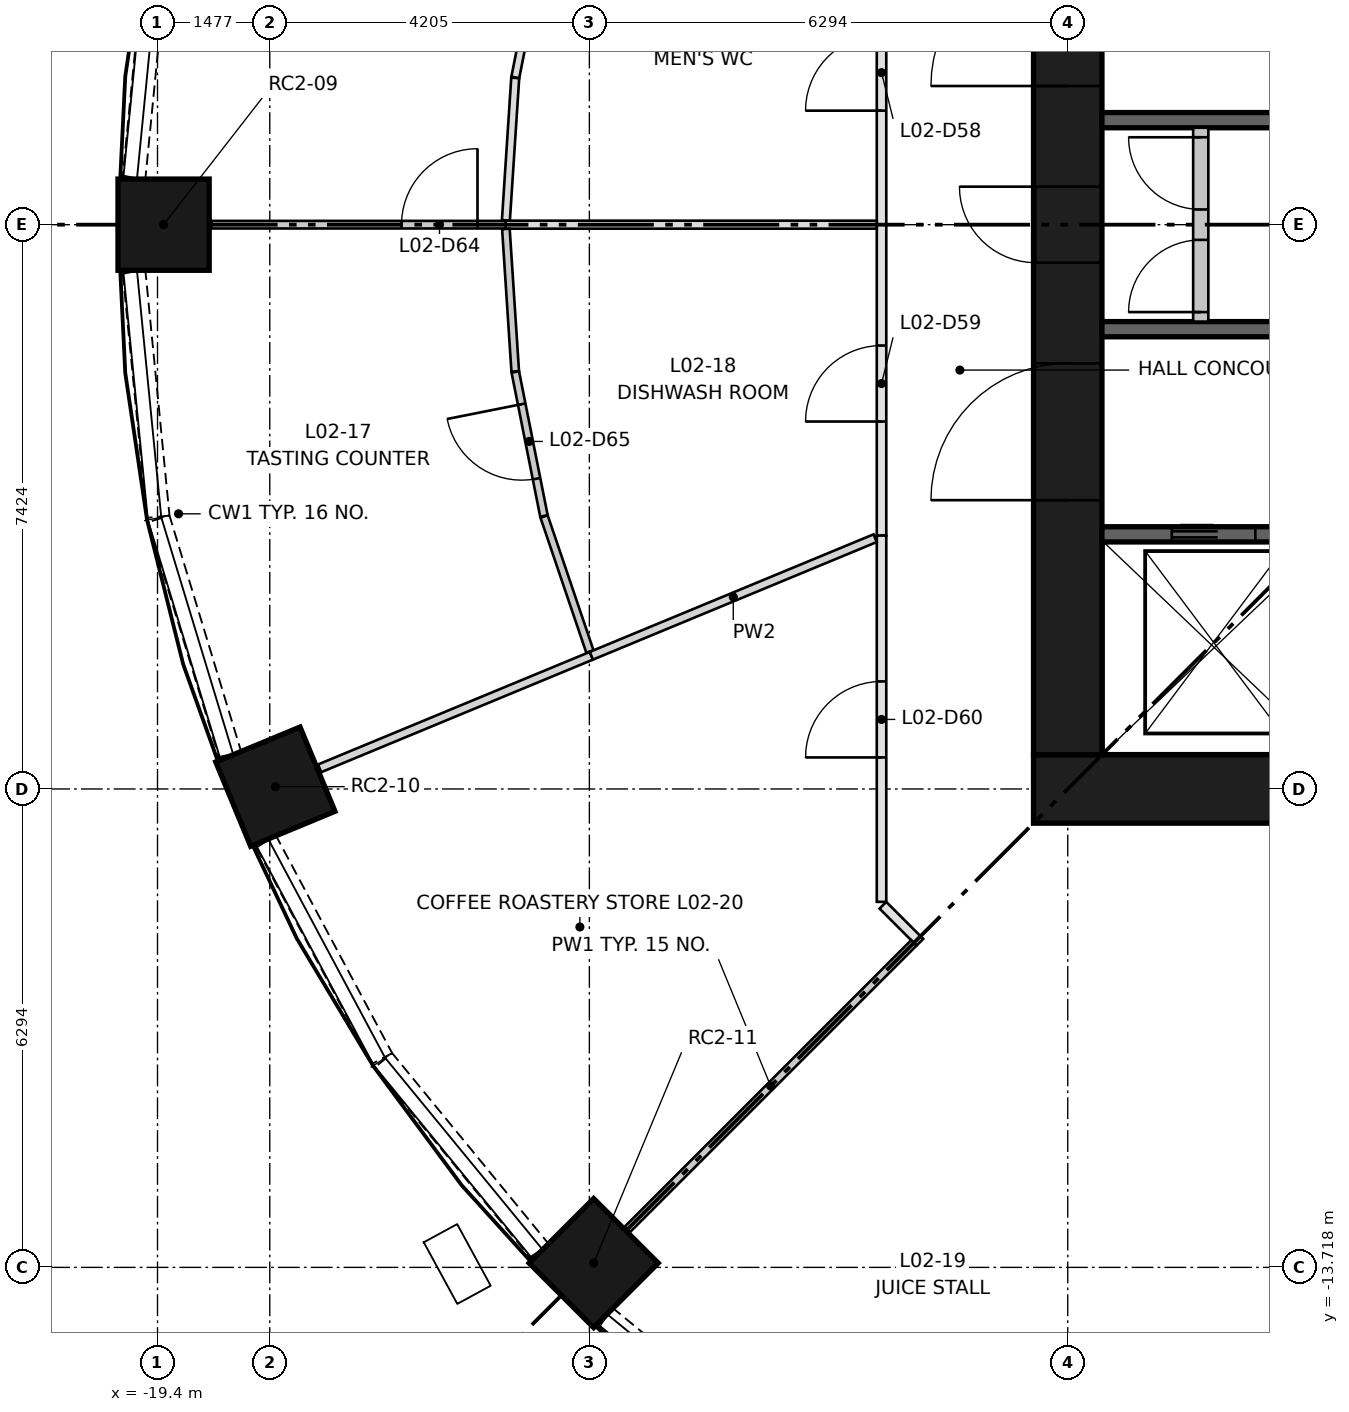
"""IFC4 building model, lengths in metres.
Left out: names, types, materials, properties, quantities, classifications, styles, units other than length and angle.
Written with IfcOpenShell. Run it as: python <this file> out.ifc"""

import sys

from ifc_helpers import new_model, si_unit, direction, frame, frame_2d, origin, origin_2d, place, context, subcontext, project, spatial, rectangle, extrude, element, fill, save


model = new_model("IFC4")
c1 = context("Model", 3, precision=1e-05, world=origin(), true_north=direction((0.0, 1.0)))
c2 = subcontext(c1, "Body", "Model", "MODEL_VIEW")
j1 = project(units=[si_unit("LENGTHUNIT", "METRE"), si_unit("PLANEANGLEUNIT", "RADIAN")], contexts=[c1])
p1 = place(None, origin())
s1 = spatial("IfcSite", under=j1, at=p1, CompositionType="ELEMENT")
p2 = place(p1, origin())
s2 = spatial("IfcBuilding", under=s1, at=p2, CompositionType="ELEMENT")
p3 = place(p2, frame((0.0, 0.0, 9.9)))
s3 = spatial("IfcBuildingStorey", under=s2, at=p3, CompositionType="ELEMENT", Elevation=9.9)
for number, where, z_axis, x_axis in (
    (1, (-19.32, 0.0, 0.0), (0.0, 0.0, 1.0), (-1.0, 0.0, 0.0)),
    (2, (-17.849, -7.394, 0.0), (0.0, 0.0, 1.0), (-0.924, -0.383, 0.0)),
    (3, (-13.661, -13.661, 0.0), (0.0, 0.0, 1.0), (-0.707, -0.707, 0.0)),
):
    element("IfcColumn", number, at=place(p3, frame(where, z_axis=z_axis, x_axis=x_axis)), inside=s3, PredefinedType="COLUMN", context=c2, shape_type="SweptSolid", body=[
        extrude(rectangle(XDim=1.2, YDim=1.2, at=origin_2d()), origin(), (0.0, 0.0, 1.0), 4.5),
    ])
p4 = place(p3, frame((-7.874, -7.424, 0.0), z_axis=(0.0, 0.0, 1.0), x_axis=(1.0, 0.0, 0.0)))
e4 = element("IfcWall", 4, at=p4, inside=s3, PredefinedType="SHEAR", context=c2, shape_type="SweptSolid", body=[
    extrude(rectangle(XDim=15.748, YDim=0.9, at=frame_2d((7.874, 0.0))), origin(), (0.0, 0.0, 1.0), 4.5),
])
p5 = place(p3, frame((-7.424, -6.974, 0.0), z_axis=(0.0, 0.0, 1.0), x_axis=(0.0, 1.0, 0.0)))
e5 = element("IfcWall", 5, at=p5, inside=s3, PredefinedType="SHEAR", context=c2, shape_type="SweptSolid", body=[
    extrude(rectangle(XDim=13.948, YDim=0.9, at=frame_2d((6.974, 0.0))), origin(), (0.0, 0.0, 1.0), 4.5),
])
p6 = place(p5, frame((6.474, 0.0, 0.0)))
e6 = element("IfcOpeningElement", 6, at=p6, cuts=e5, PredefinedType="OPENING", context=c2, shape_type="SweptSolid", body=[
    extrude(rectangle(XDim=1.0, YDim=2.1, at=frame_2d((0.5, 1.05))), frame((0.0, 0.46, 0.0), z_axis=(0.0, -1.0, 0.0), x_axis=(1.0, 0.0, 0.0)), (0.0, 0.0, 1.0), 0.92),
])
p7 = place(p5, frame((3.35, 0.0, 0.0)))
e7 = element("IfcOpeningElement", 7, at=p7, cuts=e5, PredefinedType="OPENING", context=c2, shape_type="SweptSolid", body=[
    extrude(rectangle(XDim=1.8, YDim=2.1, at=frame_2d((0.9, 1.05))), frame((0.0, 0.46, 0.0), z_axis=(0.0, -1.0, 0.0), x_axis=(1.0, 0.0, 0.0)), (0.0, 0.0, 1.0), 0.92),
])
p8 = place(p5, frame((8.799, 0.0, 0.0)))
e8 = element("IfcOpeningElement", 8, at=p8, cuts=e5, PredefinedType="OPENING", context=c2, shape_type="SweptSolid", body=[
    extrude(rectangle(XDim=1.8, YDim=2.1, at=frame_2d((0.9, 1.05))), frame((0.0, 0.46, 0.0), z_axis=(0.0, -1.0, 0.0), x_axis=(1.0, 0.0, 0.0)), (0.0, 0.0, 1.0), 0.92),
])
p9 = place(p5, frame((11.974, 0.0, 0.0)))
e9 = element("IfcOpeningElement", 9, at=p9, cuts=e5, PredefinedType="OPENING", context=c2, shape_type="SweptSolid", body=[
    extrude(rectangle(XDim=1.0, YDim=2.1, at=frame_2d((0.5, 1.05))), frame((0.0, 0.46, 0.0), z_axis=(0.0, -1.0, 0.0), x_axis=(1.0, 0.0, 0.0)), (0.0, 0.0, 1.0), 0.92),
])
p10 = place(p3, frame((-6.974, -4.074, 0.0), z_axis=(0.0, 0.0, 1.0), x_axis=(1.0, 0.0, 0.0)))
e10 = element("IfcWall", 10, at=p10, inside=s3, PredefinedType="SHEAR", context=c2, shape_type="SweptSolid", body=[
    extrude(rectangle(XDim=13.948, YDim=0.2, at=frame_2d((6.974, 0.0))), origin(), (0.0, 0.0, 1.0), 4.1),
])
p11 = place(p10, frame((0.918, 0.0, 0.0)))
e11 = element("IfcOpeningElement", 11, at=p11, cuts=e10, PredefinedType="OPENING", context=c2, shape_type="SweptSolid", body=[
    extrude(rectangle(XDim=1.1, YDim=2.1, at=frame_2d((0.55, 1.05))), frame((0.0, 0.11, 0.0), z_axis=(0.0, -1.0, 0.0), x_axis=(1.0, 0.0, 0.0)), (0.0, 0.0, 1.0), 0.22),
])
p12 = place(p10, frame((4.055, 0.0, 0.0)))
e12 = element("IfcOpeningElement", 12, at=p12, cuts=e10, PredefinedType="OPENING", context=c2, shape_type="SweptSolid", body=[
    extrude(rectangle(XDim=1.1, YDim=2.1, at=frame_2d((0.55, 1.05))), frame((0.0, 0.11, 0.0), z_axis=(0.0, -1.0, 0.0), x_axis=(1.0, 0.0, 0.0)), (0.0, 0.0, 1.0), 0.22),
])
p13 = place(p10, frame((6.658, 0.0, 0.0)))
e13 = element("IfcOpeningElement", 13, at=p13, cuts=e10, PredefinedType="OPENING", context=c2, shape_type="SweptSolid", body=[
    extrude(rectangle(XDim=1.0, YDim=2.1, at=frame_2d((0.5, 1.05))), frame((0.0, 0.11, 0.0), z_axis=(0.0, -1.0, 0.0), x_axis=(1.0, 0.0, 0.0)), (0.0, 0.0, 1.0), 0.22),
])
p14 = place(p10, frame((8.627, 0.0, 0.0)))
e14 = element("IfcOpeningElement", 14, at=p14, cuts=e10, PredefinedType="OPENING", context=c2, shape_type="SweptSolid", body=[
    extrude(rectangle(XDim=1.0, YDim=2.1, at=frame_2d((0.5, 1.05))), frame((0.0, 0.11, 0.0), z_axis=(0.0, -1.0, 0.0), x_axis=(1.0, 0.0, 0.0)), (0.0, 0.0, 1.0), 0.22),
])
p15 = place(p10, frame((10.595, 0.0, 0.0)))
e15 = element("IfcOpeningElement", 15, at=p15, cuts=e10, PredefinedType="OPENING", context=c2, shape_type="SweptSolid", body=[
    extrude(rectangle(XDim=1.0, YDim=2.1, at=frame_2d((0.5, 1.05))), frame((0.0, 0.11, 0.0), z_axis=(0.0, -1.0, 0.0), x_axis=(1.0, 0.0, 0.0)), (0.0, 0.0, 1.0), 0.22),
])
p16 = place(p10, frame((12.564, 0.0, 0.0)))
e16 = element("IfcOpeningElement", 16, at=p16, cuts=e10, PredefinedType="OPENING", context=c2, shape_type="SweptSolid", body=[
    extrude(rectangle(XDim=1.0, YDim=2.1, at=frame_2d((0.5, 1.05))), frame((0.0, 0.11, 0.0), z_axis=(0.0, -1.0, 0.0), x_axis=(1.0, 0.0, 0.0)), (0.0, 0.0, 1.0), 0.22),
])
for number, where, z_axis, x_axis in (
    (17, (-6.974, -1.375, 0.0), (0.0, 0.0, 1.0), (1.0, 0.0, 0.0)),
    (18, (-6.974, 1.375, 0.0), (0.0, 0.0, 1.0), (1.0, 0.0, 0.0)),
):
    element("IfcWall", number, at=place(p3, frame(where, z_axis=z_axis, x_axis=x_axis)), inside=s3, PredefinedType="SHEAR", context=c2, shape_type="SweptSolid", body=[
        extrude(rectangle(XDim=2.6, YDim=0.2, at=frame_2d((1.3, 0.0))), origin(), (0.0, 0.0, 1.0), 4.1),
    ])
p17 = place(p3, frame((-5.674, -1.275, 0.0), z_axis=(0.0, 0.0, 1.0), x_axis=(0.0, 1.0, 0.0)))
e19 = element("IfcWall", 19, at=p17, inside=s3, PredefinedType="PARTITIONING", context=c2, shape_type="SweptSolid", body=[
    extrude(rectangle(XDim=2.55, YDim=0.2, at=frame_2d((1.275, 0.0))), origin(), (0.0, 0.0, 1.0), 4.1),
])
p18 = place(p17, frame((0.125, 0.0, 0.0)))
e20 = element("IfcOpeningElement", 20, at=p18, cuts=e19, PredefinedType="OPENING", context=c2, shape_type="SweptSolid", body=[
    extrude(rectangle(XDim=0.95, YDim=2.1, at=frame_2d((0.475, 1.05))), frame((0.0, 0.11, 0.0), z_axis=(0.0, -1.0, 0.0), x_axis=(1.0, 0.0, 0.0)), (0.0, 0.0, 1.0), 0.22),
])
p19 = place(p17, frame((1.475, 0.0, 0.0)))
e21 = element("IfcOpeningElement", 21, at=p19, cuts=e19, PredefinedType="OPENING", context=c2, shape_type="SweptSolid", body=[
    extrude(rectangle(XDim=0.95, YDim=2.1, at=frame_2d((0.475, 1.05))), frame((0.0, 0.11, 0.0), z_axis=(0.0, -1.0, 0.0), x_axis=(1.0, 0.0, 0.0)), (0.0, 0.0, 1.0), 0.22),
])
for number, where, z_axis, x_axis in (
    (22, (-19.392, 3.842, 0.0), (0.0, 0.0, 1.0), (-0.098, -0.995, 0.0)),
    (23, (-19.709, -0.613, 0.0), (0.0, 0.0, 1.0), (0.098, -0.995, 0.0)),
):
    element("IfcWall", number, at=place(p3, frame(where, z_axis=z_axis, x_axis=x_axis)), inside=s3, PredefinedType="SOLIDWALL", context=c2, shape_type="SweptSolid", body=[
        extrude(rectangle(XDim=3.245, YDim=0.3, at=frame_2d((1.623, 0.0))), origin(), (0.0, 0.0, 1.0), 0.45),
    ])
p20 = place(p3, frame((-19.385, -3.871, 0.0), z_axis=(0.0, 0.0, 1.0), x_axis=(0.290418848098, -0.95689962518, 0.0)))
e24 = element("IfcWall", 24, at=p20, inside=s3, PredefinedType="SOLIDWALL", context=c2, shape_type="SweptSolid", body=[
    extrude(rectangle(XDim=3.244, YDim=0.3, at=frame_2d((1.622, 0.0))), origin(), (0.0, 0.0, 1.0), 0.45),
])
p21 = place(p3, frame((-17.974, -8.108, 0.0), z_axis=(0.0, 0.0, 1.0), x_axis=(0.471220846392, -0.882015257196, 0.0)))
e25 = element("IfcWall", 25, at=p21, inside=s3, PredefinedType="SOLIDWALL", context=c2, shape_type="SweptSolid", body=[
    extrude(rectangle(XDim=3.244, YDim=0.3, at=frame_2d((1.622, 0.0))), origin(), (0.0, 0.0, 1.0), 0.45),
])
for number, where, z_axis, x_axis in (
    (26, (-16.428, -10.995, 0.0), (0.0, 0.0, 1.0), (0.634, -0.773, 0.0)),
    (27, (-13.503, -14.371, 0.0), (0.0, 0.0, 1.0), (0.773, -0.634, 0.0)),
):
    element("IfcWall", number, at=place(p3, frame(where, z_axis=z_axis, x_axis=x_axis)), inside=s3, PredefinedType="SOLIDWALL", context=c2, shape_type="SweptSolid", body=[
        extrude(rectangle(XDim=3.245, YDim=0.3, at=frame_2d((1.623, 0.0))), origin(), (0.0, 0.0, 1.0), 0.45),
    ])
p22 = place(p3, frame((-9.874, 0.0, 0.0), z_axis=(0.0, 0.0, 1.0), x_axis=(0.0, 1.0, 0.0)))
e28 = element("IfcWall", 28, at=p22, inside=s3, PredefinedType="PARTITIONING", context=c2, shape_type="SweptSolid", body=[
    extrude(rectangle(XDim=4.048, YDim=0.125, at=frame_2d((2.024, 0.0))), origin(), (0.0, 0.0, 1.0), 4.1),
])
p23 = place(p22, frame((1.5, 0.0, 0.0)))
e29 = element("IfcOpeningElement", 29, at=p23, cuts=e28, PredefinedType="OPENING", context=c2, shape_type="SweptSolid", body=[
    extrude(rectangle(XDim=1.0, YDim=2.1, at=frame_2d((0.5, 1.05))), frame((0.0, 0.073, 0.0), z_axis=(0.0, -1.0, 0.0), x_axis=(1.0, 0.0, 0.0)), (0.0, 0.0, 1.0), 0.145),
])
p24 = place(p3, frame((-9.874, -4.09, 0.0), z_axis=(0.0, 0.0, 1.0), x_axis=(0.0, 1.0, 0.0)))
e30 = element("IfcWall", 30, at=p24, inside=s3, PredefinedType="PARTITIONING", context=c2, shape_type="SweptSolid", body=[
    extrude(rectangle(XDim=4.09, YDim=0.125, at=frame_2d((2.045, 0.0))), origin(), (0.0, 0.0, 1.0), 4.1),
])
p25 = place(p24, frame((1.5, 0.0, 0.0)))
e31 = element("IfcOpeningElement", 31, at=p25, cuts=e30, PredefinedType="OPENING", context=c2, shape_type="SweptSolid", body=[
    extrude(rectangle(XDim=1.0, YDim=2.1, at=frame_2d((0.5, 1.05))), frame((0.0, 0.073, 0.0), z_axis=(0.0, -1.0, 0.0), x_axis=(1.0, 0.0, 0.0)), (0.0, 0.0, 1.0), 0.145),
])
p26 = place(p3, frame((-9.874, -8.909, 0.0), z_axis=(0.0, 0.0, 1.0), x_axis=(0.0, 1.0, 0.0)))
e32 = element("IfcWall", 32, at=p26, inside=s3, PredefinedType="PARTITIONING", context=c2, shape_type="SweptSolid", body=[
    extrude(rectangle(XDim=4.819, YDim=0.125, at=frame_2d((2.41, 0.0))), origin(), (0.0, 0.0, 1.0), 4.1),
])
p27 = place(p26, frame((1.9, 0.0, 0.0)))
e33 = element("IfcOpeningElement", 33, at=p27, cuts=e32, PredefinedType="OPENING", context=c2, shape_type="SweptSolid", body=[
    extrude(rectangle(XDim=1.0, YDim=2.1, at=frame_2d((0.5, 1.05))), frame((0.0, 0.073, 0.0), z_axis=(0.0, -1.0, 0.0), x_axis=(1.0, 0.0, 0.0)), (0.0, 0.0, 1.0), 0.145),
])
p28 = place(p3, frame((-9.369, -9.44, 0.0), z_axis=(0.0, 0.0, 1.0), x_axis=(-0.707106781187, 0.707106781187, 0.0)))
e34 = element("IfcWall", 34, at=p28, inside=s3, PredefinedType="PARTITIONING", context=c2, shape_type="SweptSolid", body=[
    extrude(rectangle(XDim=0.688, YDim=0.125, at=frame_2d((0.344, 0.0))), origin(), (0.0, 0.0, 1.0), 4.1),
])
p29 = place(p3, frame((-14.816, 0.056, 0.0), z_axis=(0.0, 0.0, 1.0), x_axis=(0.065484143156, 0.997853610003, 0.0)))
e35 = element("IfcWall", 35, at=p29, inside=s3, PredefinedType="PARTITIONING", context=c2, shape_type="SweptSolid", body=[
    extrude(rectangle(XDim=1.879, YDim=0.105, at=frame_2d((0.939, 0.0))), origin(), (0.0, 0.0, 1.0), 4.1),
])
p30 = place(p3, frame((-14.692, 1.938, 0.0), z_axis=(0.0, 0.0, 1.0), x_axis=(0.195022239668, 0.980798820368, 0.0)))
e36 = element("IfcWall", 36, at=p30, inside=s3, PredefinedType="PARTITIONING", context=c2, shape_type="SweptSolid", body=[
    extrude(rectangle(XDim=1.932, YDim=0.105, at=frame_2d((0.966, 0.0))), origin(), (0.0, 0.0, 1.0), 4.1),
])
p31 = place(p3, frame((-9.937, 0.0, 0.0), z_axis=(0.0, 0.0, 1.0), x_axis=(-1.0, 0.0, 0.0)))
e37 = element("IfcWall", 37, at=p31, inside=s3, PredefinedType="PARTITIONING", context=c2, shape_type="SweptSolid", body=[
    extrude(rectangle(XDim=4.884, YDim=0.105, at=frame_2d((2.442, 0.0))), origin(), (0.0, 0.0, 1.0), 4.1),
])
p32 = place(p3, frame((-18.69, 0.0, 0.0), z_axis=(0.0, 0.0, 1.0), x_axis=(1.0, 0.0, 0.0)))
e38 = element("IfcWall", 38, at=p32, inside=s3, PredefinedType="PARTITIONING", context=c2, shape_type="SweptSolid", body=[
    extrude(rectangle(XDim=3.87, YDim=0.1, at=frame_2d((1.935, 0.0))), origin(), (0.0, 0.0, 1.0), 4.1),
])
p33 = place(p32, frame((2.5, 0.0, 0.0)))
e39 = element("IfcOpeningElement", 39, at=p33, cuts=e38, PredefinedType="OPENING", context=c2, shape_type="SweptSolid", body=[
    extrude(rectangle(XDim=1.0, YDim=2.1, at=frame_2d((0.5, 1.05))), frame((0.0, 0.06, 0.0), z_axis=(0.0, -1.0, 0.0), x_axis=(1.0, 0.0, 0.0)), (0.0, 0.0, 1.0), 0.12),
])
p34 = place(p3, frame((-14.816, -0.056, 0.0), z_axis=(0.0, 0.0, 1.0), x_axis=(0.065475654237, -0.997854167052, 0.0)))
e40 = element("IfcWall", 40, at=p34, inside=s3, PredefinedType="PARTITIONING", context=c2, shape_type="SweptSolid", body=[
    extrude(rectangle(XDim=1.879, YDim=0.1, at=frame_2d((0.94, 0.0))), origin(), (0.0, 0.0, 1.0), 4.1),
])
p35 = place(p3, frame((-14.316, -3.833, 0.0), z_axis=(0.0, 0.0, 1.0), x_axis=(-0.195095451873, 0.980784259997, 0.0)))
e41 = element("IfcWall", 41, at=p35, inside=s3, PredefinedType="PARTITIONING", context=c2, shape_type="SweptSolid", body=[
    extrude(rectangle(XDim=1.932, YDim=0.1, at=frame_2d((0.966, 0.0))), origin(), (0.0, 0.0, 1.0), 4.1),
])
p36 = place(p35, frame((0.5, 0.0, 0.0)))
e42 = element("IfcOpeningElement", 42, at=p36, cuts=e41, PredefinedType="OPENING", context=c2, shape_type="SweptSolid", body=[
    extrude(rectangle(XDim=1.0, YDim=2.1, at=frame_2d((0.5, 1.05))), frame((0.0, 0.06, 0.0), z_axis=(0.0, -1.0, 0.0), x_axis=(1.0, 0.0, 0.0)), (0.0, 0.0, 1.0), 0.12),
])
p37 = place(p3, frame((-14.314, -3.839, 0.0), z_axis=(0.0, 0.0, 1.0), x_axis=(0.321412988648, -0.946939116696, 0.0)))
e43 = element("IfcWall", 43, at=p37, inside=s3, PredefinedType="PARTITIONING", context=c2, shape_type="SweptSolid", body=[
    extrude(rectangle(XDim=1.877, YDim=0.1, at=frame_2d((0.938, 0.0))), origin(), (0.0, 0.0, 1.0), 4.1),
])
p38 = place(p3, frame((-13.692, -5.671, 0.0), z_axis=(0.0, 0.0, 1.0), x_axis=(-0.923883048049, -0.382674944996, 0.0)))
e44 = element("IfcWall", 44, at=p38, inside=s3, PredefinedType="PARTITIONING", context=c2, shape_type="SweptSolid", body=[
    extrude(rectangle(XDim=3.87, YDim=0.11, at=frame_2d((1.935, 0.0))), origin(), (0.0, 0.0, 1.0), 4.1),
])
p39 = place(p3, frame((-9.958, -4.125, 0.0), z_axis=(0.0, 0.0, 1.0), x_axis=(-0.923875488976, -0.382693194178, 0.0)))
e45 = element("IfcWall", 45, at=p39, inside=s3, PredefinedType="PARTITIONING", context=c2, shape_type="SweptSolid", body=[
    extrude(rectangle(XDim=4.042, YDim=0.11, at=frame_2d((2.021, 0.0))), origin(), (0.0, 0.0, 1.0), 4.1),
])
p40 = place(p3, frame((-13.216, -13.216, 0.0), z_axis=(0.0, 0.0, 1.0), x_axis=(0.707106781187, 0.707106781187, 0.0)))
e46 = element("IfcWall", 46, at=p40, inside=s3, PredefinedType="PARTITIONING", context=c2, shape_type="SweptSolid", body=[
    extrude(rectangle(XDim=5.327, YDim=0.1, at=frame_2d((2.664, 0.0))), origin(), (0.0, 0.0, 1.0), 4.1),
])
p41 = place(p11, origin())
e47 = element("IfcDoor", 47, at=p41, inside=s3, OperationType="DOUBLE_DOOR_SLIDING", PredefinedType="DOOR", context=c2, shape_type="SweptSolid", body=[
    extrude(rectangle(XDim=1.1, YDim=2.1, at=frame_2d((0.55, 1.05))), frame((0.0, 0.025, 0.0), z_axis=(0.0, -1.0, 0.0), x_axis=(1.0, 0.0, 0.0)), (0.0, 0.0, 1.0), 0.05),
])
fill(e11, e47)
p42 = place(p18, origin())
e48 = element("IfcDoor", 48, at=p42, inside=s3, OperationType="SINGLE_SWING_LEFT", PredefinedType="DOOR", context=c2, shape_type="SweptSolid", body=[
    extrude(rectangle(XDim=0.95, YDim=2.1, at=frame_2d((0.475, 1.05))), frame((0.0, 0.025, 0.0), z_axis=(0.0, -1.0, 0.0), x_axis=(1.0, 0.0, 0.0)), (0.0, 0.0, 1.0), 0.05),
])
fill(e20, e48)
p43 = place(p19, origin())
e49 = element("IfcDoor", 49, at=p43, inside=s3, OperationType="SINGLE_SWING_RIGHT", PredefinedType="DOOR", context=c2, shape_type="SweptSolid", body=[
    extrude(rectangle(XDim=0.95, YDim=2.1, at=frame_2d((0.475, 1.05))), frame((0.0, 0.025, 0.0), z_axis=(0.0, -1.0, 0.0), x_axis=(1.0, 0.0, 0.0)), (0.0, 0.0, 1.0), 0.05),
])
fill(e21, e49)
p44 = place(p6, origin())
e50 = element("IfcDoor", 50, at=p44, inside=s3, OperationType="SINGLE_SWING_RIGHT", PredefinedType="DOOR", context=c2, shape_type="SweptSolid", body=[
    extrude(rectangle(XDim=1.0, YDim=2.1, at=frame_2d((0.5, 1.05))), frame((0.0, 0.45, 0.0), z_axis=(0.0, -1.0, 0.0), x_axis=(1.0, 0.0, 0.0)), (0.0, 0.0, 1.0), 0.05),
])
fill(e6, e50)
p45 = place(p7, origin())
e51 = element("IfcDoor", 51, at=p45, inside=s3, OperationType="DOUBLE_DOOR_SINGLE_SWING", PredefinedType="DOOR", context=c2, shape_type="SweptSolid", body=[
    extrude(rectangle(XDim=1.8, YDim=2.1, at=frame_2d((0.9, 1.05))), frame((0.0, 0.025, 0.0), z_axis=(0.0, -1.0, 0.0), x_axis=(1.0, 0.0, 0.0)), (0.0, 0.0, 1.0), 0.05),
])
fill(e7, e51)
p46 = place(p8, origin())
e52 = element("IfcDoor", 52, at=p46, inside=s3, OperationType="DOUBLE_DOOR_SINGLE_SWING", PredefinedType="DOOR", context=c2, shape_type="SweptSolid", body=[
    extrude(rectangle(XDim=1.8, YDim=2.1, at=frame_2d((0.9, 1.05))), frame((0.0, 0.025, 0.0), z_axis=(0.0, -1.0, 0.0), x_axis=(1.0, 0.0, 0.0)), (0.0, 0.0, 1.0), 0.05),
])
fill(e8, e52)
p47 = place(p23, origin())
e53 = element("IfcDoor", 53, at=p47, inside=s3, OperationType="SINGLE_SWING_LEFT", PredefinedType="DOOR", context=c2, shape_type="SweptSolid", body=[
    extrude(rectangle(XDim=1.0, YDim=2.1, at=frame_2d((0.5, 1.05))), frame((0.0, 0.025, 0.0), z_axis=(0.0, -1.0, 0.0), x_axis=(1.0, 0.0, 0.0)), (0.0, 0.0, 1.0), 0.05),
])
fill(e29, e53)
p48 = place(p25, origin())
e54 = element("IfcDoor", 54, at=p48, inside=s3, OperationType="SINGLE_SWING_LEFT", PredefinedType="DOOR", context=c2, shape_type="SweptSolid", body=[
    extrude(rectangle(XDim=1.0, YDim=2.1, at=frame_2d((0.5, 1.05))), frame((0.0, 0.025, 0.0), z_axis=(0.0, -1.0, 0.0), x_axis=(1.0, 0.0, 0.0)), (0.0, 0.0, 1.0), 0.05),
])
fill(e31, e54)
p49 = place(p27, origin())
e55 = element("IfcDoor", 55, at=p49, inside=s3, OperationType="SINGLE_SWING_LEFT", PredefinedType="DOOR", context=c2, shape_type="SweptSolid", body=[
    extrude(rectangle(XDim=1.0, YDim=2.1, at=frame_2d((0.5, 1.05))), frame((0.0, 0.025, 0.0), z_axis=(0.0, -1.0, 0.0), x_axis=(1.0, 0.0, 0.0)), (0.0, 0.0, 1.0), 0.05),
])
fill(e33, e55)
p50 = place(p33, origin())
e56 = element("IfcDoor", 56, at=p50, inside=s3, OperationType="SINGLE_SWING_RIGHT", PredefinedType="DOOR", context=c2, shape_type="SweptSolid", body=[
    extrude(rectangle(XDim=1.0, YDim=2.1, at=frame_2d((0.5, 1.05))), frame((0.0, 0.025, 0.0), z_axis=(0.0, -1.0, 0.0), x_axis=(1.0, 0.0, 0.0)), (0.0, 0.0, 1.0), 0.05),
])
fill(e39, e56)
p51 = place(p36, origin())
e57 = element("IfcDoor", 57, at=p51, inside=s3, OperationType="SINGLE_SWING_RIGHT", PredefinedType="DOOR", context=c2, shape_type="SweptSolid", body=[
    extrude(rectangle(XDim=1.0, YDim=2.1, at=frame_2d((0.5, 1.05))), frame((0.0, 0.025, 0.0), z_axis=(0.0, -1.0, 0.0), x_axis=(1.0, 0.0, 0.0)), (0.0, 0.0, 1.0), 0.05),
])
fill(e42, e57)
save(model, sys.argv[1])
